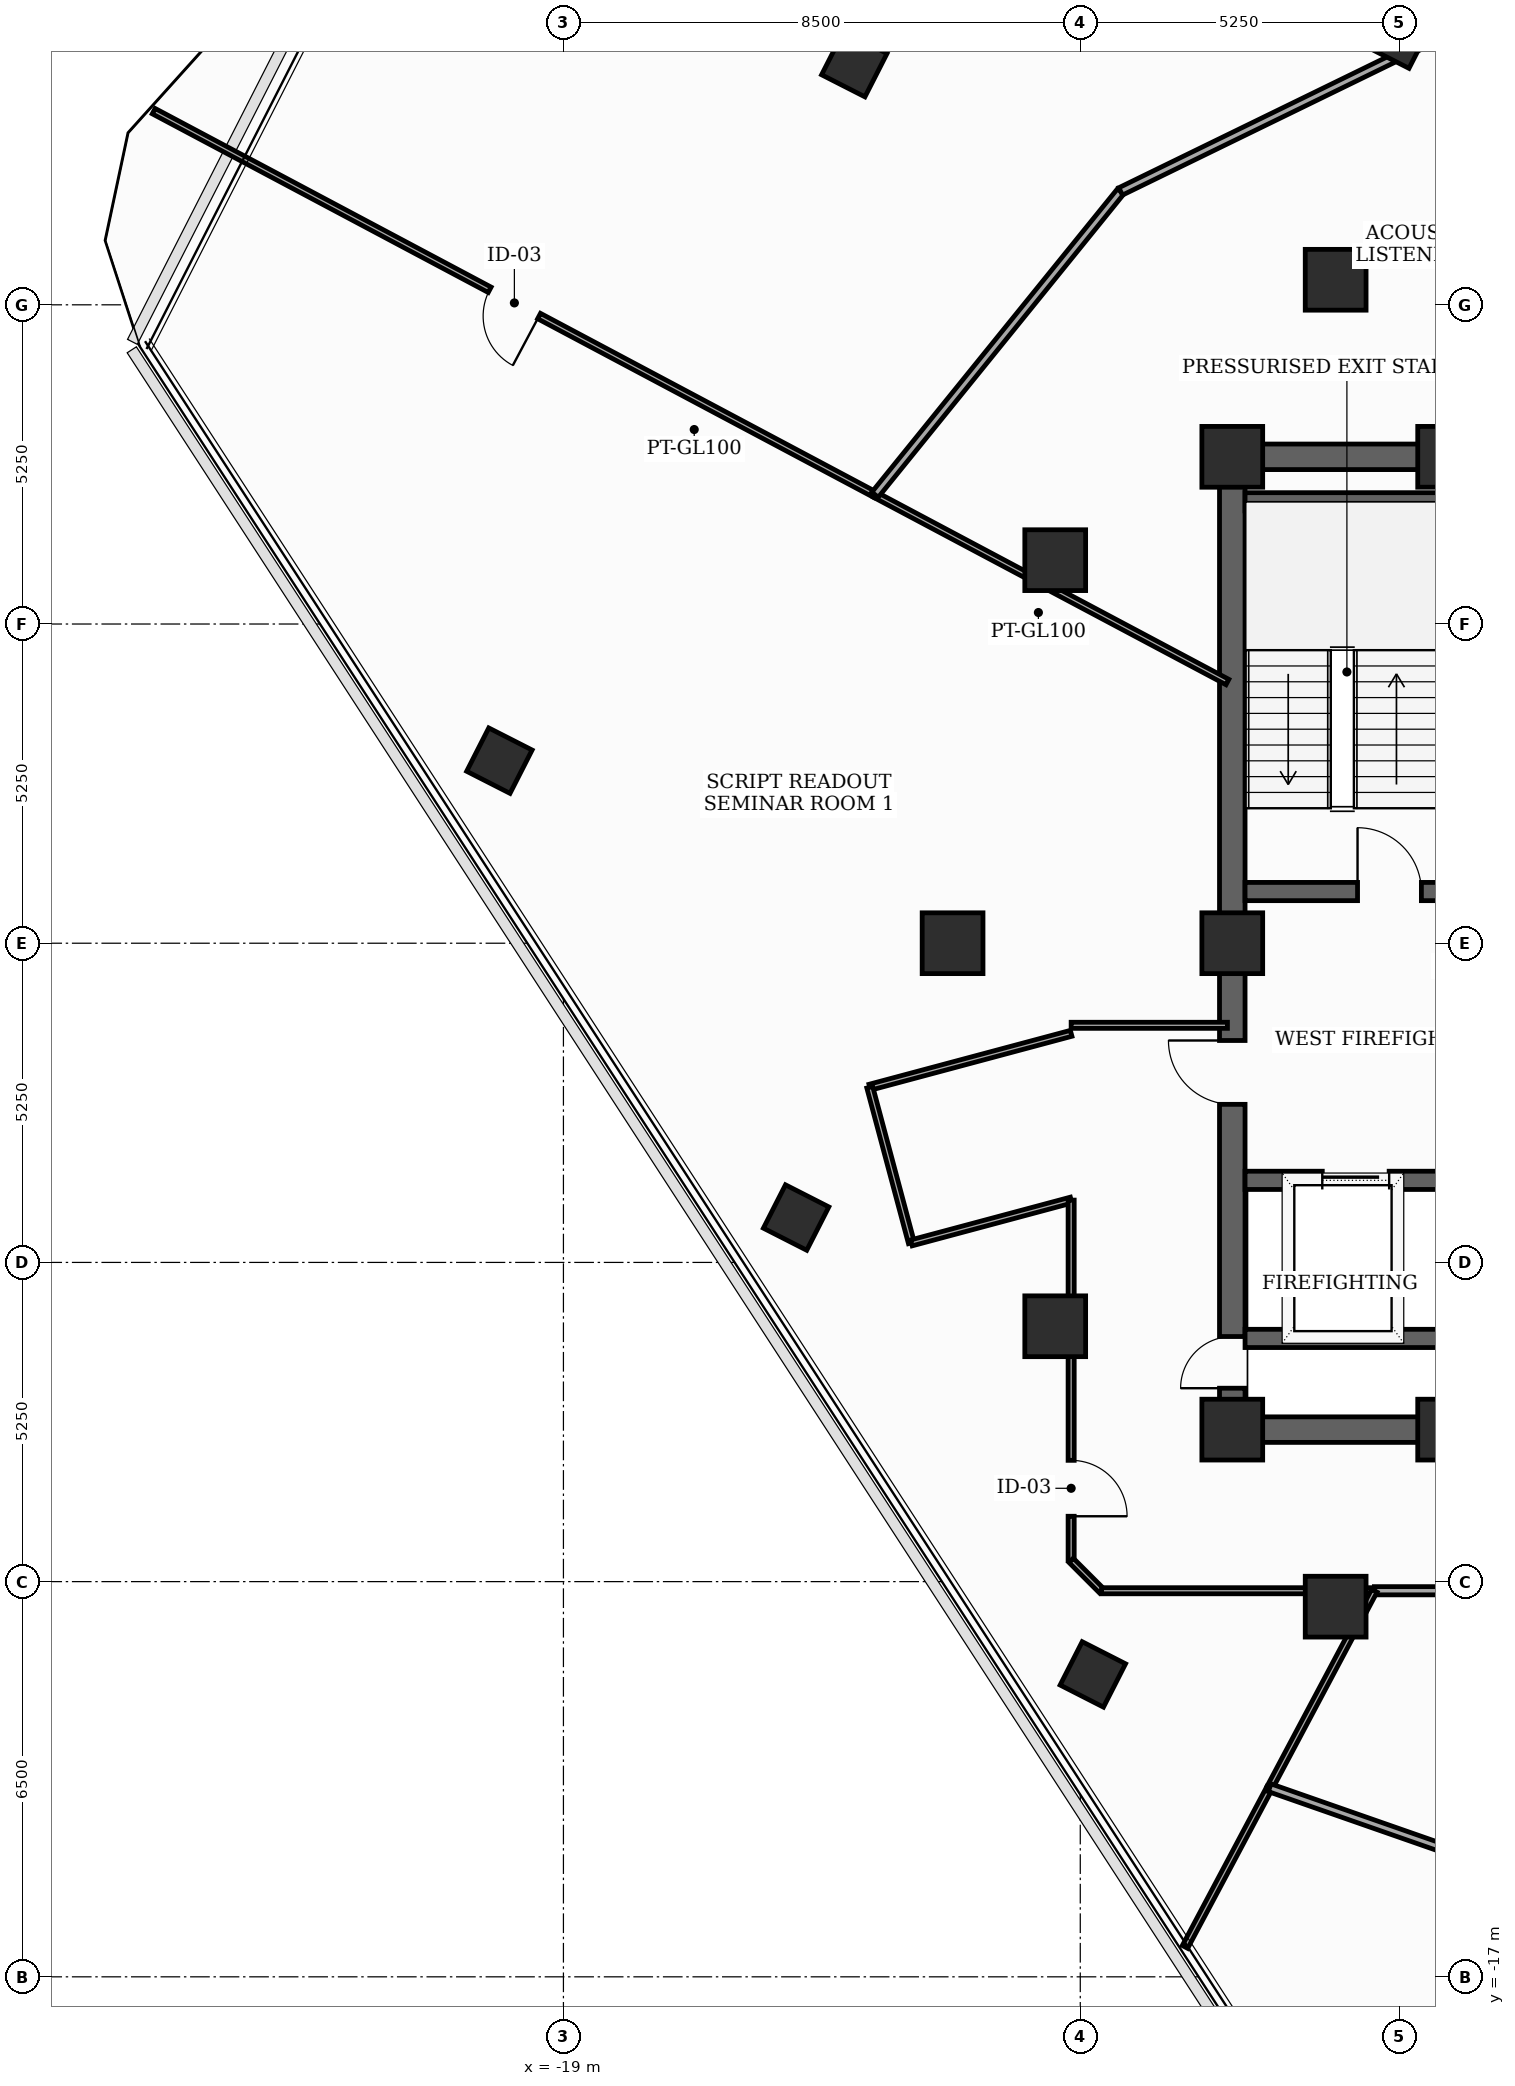
"""IFC4 building model, lengths in metres.
Left out: names, types, materials, properties, quantities, classifications, styles, units other than length and angle.
Written with IfcOpenShell. Run it as: python <this file> out.ifc"""

import sys

from ifc_helpers import new_model, si_unit, direction, frame, frame_2d, origin, origin_2d, place, context, subcontext, project, spatial, rectangle, extrude, element, fill, save


model = new_model("IFC4")
c1 = context("Model", 3, precision=1e-05, world=origin(), true_north=direction((0.0, 1.0)))
c2 = subcontext(c1, "Body", "Model", "MODEL_VIEW")
j1 = project(units=[si_unit("LENGTHUNIT", "METRE"), si_unit("PLANEANGLEUNIT", "RADIAN")], contexts=[c1])
p1 = place(None, origin())
s1 = spatial("IfcSite", under=j1, at=p1, CompositionType="ELEMENT")
p2 = place(p1, origin())
s2 = spatial("IfcBuilding", under=s1, at=p2, CompositionType="ELEMENT")
p3 = place(p2, frame((0.0, 0.0, 274.4)))
s3 = spatial("IfcBuildingStorey", under=s2, at=p3, CompositionType="ELEMENT", Elevation=274.4)
for number, where, z_axis, x_axis in (
    (1, (-8.0, -8.0, 0.0), (0.0, 0.0, 1.0), (1.0, 0.0, 0.0)),
    (2, (-4.45, -8.0, 0.0), (0.0, 0.0, 1.0), (1.0, 0.0, 0.0)),
    (3, (-4.45, 8.0, 0.0), (0.0, 0.0, 1.0), (1.0, 0.0, 0.0)),
    (4, (-8.0, 8.0, 0.0), (0.0, 0.0, 1.0), (1.0, 0.0, 0.0)),
    (5, (-8.0, 0.0, 0.0), (0.0, 0.0, 1.0), (1.0, 0.0, 0.0)),
    (6, (-6.3, 10.912, 0.0), (0.0, 0.0, 1.0), (1.0, 0.0, 0.0)),
    (7, (-10.912, 6.3, 0.0), (0.0, 0.0, 1.0), (1.0, 0.0, 0.0)),
    (8, (-12.6, 0.0, 0.0), (0.0, 0.0, 1.0), (1.0, 0.0, 0.0)),
    (9, (-10.912, -6.3, 0.0), (0.0, 0.0, 1.0), (1.0, 0.0, 0.0)),
    (10, (-6.3, -10.912, 0.0), (0.0, 0.0, 1.0), (1.0, 0.0, 0.0)),
):
    element("IfcColumn", number, at=place(p3, frame(where, z_axis=z_axis, x_axis=x_axis)), inside=s3, PredefinedType="COLUMN", context=c2, shape_type="SweptSolid", body=[
        extrude(rectangle(XDim=1.0, YDim=1.0, at=origin_2d()), origin(), (0.0, 0.0, 1.0), 3.7),
    ])
for number, where, z_axis, x_axis in (
    (11, (-5.269, 14.927, 0.0), (0.0, 0.0, 1.0), (0.454, 0.891, 0.0)),
    (12, (-14.216, 14.458, 0.0), (0.0, 0.0, 1.0), (0.454, 0.891, 0.0)),
    (13, (-20.053, 3.003, 0.0), (0.0, 0.0, 1.0), (0.454, 0.891, 0.0)),
    (14, (-15.173, -4.512, 0.0), (0.0, 0.0, 1.0), (0.454, 0.891, 0.0)),
    (15, (-10.293, -12.026, 0.0), (0.0, 0.0, 1.0), (0.454, 0.891, 0.0)),
):
    element("IfcColumn", number, at=place(p3, frame(where, z_axis=z_axis, x_axis=x_axis)), inside=s3, PredefinedType="COLUMN", context=c2, shape_type="SweptSolid", body=[
        extrude(rectangle(XDim=0.8, YDim=0.8, at=origin_2d()), origin(), (0.0, 0.0, 1.0), 3.7),
    ])
p4 = place(p3, frame((-8.0, -8.0, 0.0), z_axis=(0.0, 0.0, 1.0), x_axis=(0.0, 1.0, 0.0)))
e16 = element("IfcWall", 16, at=p4, inside=s3, PredefinedType="SHEAR", context=c2, shape_type="SweptSolid", body=[
    extrude(rectangle(XDim=16.0, YDim=0.42, at=frame_2d((8.0, 0.0))), origin(), (0.0, 0.0, 1.0), 3.46),
])
p5 = place(p4, frame((0.681, 0.0, 0.0)))
e17 = element("IfcOpeningElement", 17, at=p5, cuts=e16, PredefinedType="OPENING", context=c2, shape_type="SweptSolid", body=[
    extrude(rectangle(XDim=0.85, YDim=2.02, at=frame_2d((0.425, 1.01))), frame((0.0, 0.22, 0.0), z_axis=(0.0, -1.0, 0.0), x_axis=(1.0, 0.0, 0.0)), (0.0, 0.0, 1.0), 0.44),
])
p6 = place(p4, frame((5.35, 0.0, 0.0)))
e18 = element("IfcOpeningElement", 18, at=p6, cuts=e16, PredefinedType="OPENING", context=c2, shape_type="SweptSolid", body=[
    extrude(rectangle(XDim=1.05, YDim=2.15, at=frame_2d((0.525, 1.075))), frame((0.0, 0.22, 0.0), z_axis=(0.0, -1.0, 0.0), x_axis=(1.0, 0.0, 0.0)), (0.0, 0.0, 1.0), 0.44),
])
p7 = place(p3, frame((-8.0, -8.0, 0.0), z_axis=(0.0, 0.0, 1.0), x_axis=(1.0, 0.0, 0.0)))
e19 = element("IfcWall", 19, at=p7, inside=s3, PredefinedType="SHEAR", context=c2, shape_type="SweptSolid", body=[
    extrude(rectangle(XDim=16.0, YDim=0.42, at=frame_2d((8.0, 0.0))), origin(), (0.0, 0.0, 1.0), 3.46),
])
p8 = place(p7, frame((4.35, 0.0, 0.0)))
e20 = element("IfcOpeningElement", 20, at=p8, cuts=e19, PredefinedType="OPENING", context=c2, shape_type="SweptSolid", body=[
    extrude(rectangle(XDim=0.85, YDim=2.02, at=frame_2d((0.425, 1.01))), frame((0.0, 0.22, 0.0), z_axis=(0.0, -1.0, 0.0), x_axis=(1.0, 0.0, 0.0)), (0.0, 0.0, 1.0), 0.44),
])
p9 = place(p7, frame((6.49, 0.0, 0.0)))
e21 = element("IfcOpeningElement", 21, at=p9, cuts=e19, PredefinedType="OPENING", context=c2, shape_type="SweptSolid", body=[
    extrude(rectangle(XDim=0.85, YDim=2.02, at=frame_2d((0.425, 1.01))), frame((0.0, 0.22, 0.0), z_axis=(0.0, -1.0, 0.0), x_axis=(1.0, 0.0, 0.0)), (0.0, 0.0, 1.0), 0.44),
])
p10 = place(p7, frame((8.69, 0.0, 0.0)))
e22 = element("IfcOpeningElement", 22, at=p10, cuts=e19, PredefinedType="OPENING", context=c2, shape_type="SweptSolid", body=[
    extrude(rectangle(XDim=0.85, YDim=2.02, at=frame_2d((0.425, 1.01))), frame((0.0, 0.22, 0.0), z_axis=(0.0, -1.0, 0.0), x_axis=(1.0, 0.0, 0.0)), (0.0, 0.0, 1.0), 0.44),
])
p11 = place(p7, frame((10.8, 0.0, 0.0)))
e23 = element("IfcOpeningElement", 23, at=p11, cuts=e19, PredefinedType="OPENING", context=c2, shape_type="SweptSolid", body=[
    extrude(rectangle(XDim=0.85, YDim=2.02, at=frame_2d((0.425, 1.01))), frame((0.0, 0.22, 0.0), z_axis=(0.0, -1.0, 0.0), x_axis=(1.0, 0.0, 0.0)), (0.0, 0.0, 1.0), 0.44),
])
p12 = place(p3, frame((-8.0, 8.0, 0.0), z_axis=(0.0, 0.0, 1.0), x_axis=(1.0, 0.0, 0.0)))
e24 = element("IfcWall", 24, at=p12, inside=s3, PredefinedType="SHEAR", context=c2, shape_type="SweptSolid", body=[
    extrude(rectangle(XDim=16.0, YDim=0.42, at=frame_2d((8.0, 0.0))), origin(), (0.0, 0.0, 1.0), 3.46),
])
p13 = place(p12, frame((7.1, 0.0, 0.0)))
e25 = element("IfcOpeningElement", 25, at=p13, cuts=e24, PredefinedType="OPENING", context=c2, shape_type="SweptSolid", body=[
    extrude(rectangle(XDim=1.8, YDim=2.15, at=frame_2d((0.9, 1.075))), frame((0.0, 0.22, 0.0), z_axis=(0.0, -1.0, 0.0), x_axis=(1.0, 0.0, 0.0)), (0.0, 0.0, 1.0), 0.44),
])
p14 = place(p3, frame((-7.79, 0.85, 0.0), z_axis=(0.0, 0.0, 1.0), x_axis=(1.0, 0.0, 0.0)))
e26 = element("IfcWall", 26, at=p14, inside=s3, PredefinedType="SHEAR", context=c2, shape_type="SweptSolid", body=[
    extrude(rectangle(XDim=3.34, YDim=0.3, at=frame_2d((1.67, 0.0))), origin(), (0.0, 0.0, 1.0), 3.46),
])
p15 = place(p14, frame((1.85, 0.0, 0.0)))
e27 = element("IfcOpeningElement", 27, at=p15, cuts=e26, PredefinedType="OPENING", context=c2, shape_type="SweptSolid", body=[
    extrude(rectangle(XDim=1.05, YDim=2.15, at=frame_2d((0.525, 1.075))), frame((0.0, 0.16, 0.0), z_axis=(0.0, -1.0, 0.0), x_axis=(1.0, 0.0, 0.0)), (0.0, 0.0, 1.0), 0.32),
])
p16 = place(p3, frame((-7.79, 7.26, 0.0), z_axis=(0.0, 0.0, 1.0), x_axis=(1.0, 0.0, 0.0)))
e28 = element("IfcWall", 28, at=p16, inside=s3, PredefinedType="SHEAR", context=c2, shape_type="SweptSolid", body=[
    extrude(rectangle(XDim=3.34, YDim=0.3, at=frame_2d((1.67, 0.0))), origin(), (0.0, 0.0, 1.0), 3.46),
])
p17 = place(p3, frame((-7.79, -3.9, 0.0), z_axis=(0.0, 0.0, 1.0), x_axis=(1.0, 0.0, 0.0)))
e29 = element("IfcWall", 29, at=p17, inside=s3, PredefinedType="SHEAR", context=c2, shape_type="SweptSolid", body=[
    extrude(rectangle(XDim=3.34, YDim=0.3, at=frame_2d((1.67, 0.0))), origin(), (0.0, 0.0, 1.0), 3.46),
])
p18 = place(p17, frame((1.27, 0.0, 0.0)))
e30 = element("IfcOpeningElement", 30, at=p18, cuts=e29, PredefinedType="OPENING", context=c2, shape_type="SweptSolid", body=[
    extrude(rectangle(XDim=1.1, YDim=2.1, at=frame_2d((0.55, 1.05))), frame((0.0, 0.16, 0.0), z_axis=(0.0, -1.0, 0.0), x_axis=(1.0, 0.0, 0.0)), (0.0, 0.0, 1.0), 0.32),
])
p19 = place(p3, frame((-7.79, -6.5, 0.0), z_axis=(0.0, 0.0, 1.0), x_axis=(1.0, 0.0, 0.0)))
e31 = element("IfcWall", 31, at=p19, inside=s3, PredefinedType="SHEAR", context=c2, shape_type="SweptSolid", body=[
    extrude(rectangle(XDim=3.34, YDim=0.3, at=frame_2d((1.67, 0.0))), origin(), (0.0, 0.0, 1.0), 3.46),
])
p20 = place(p3, frame((-8.08, -1.35, 0.0), z_axis=(0.0, 0.0, 1.0), x_axis=(-1.0, 0.0, 0.0)))
e32 = element("IfcWall", 32, at=p20, inside=s3, PredefinedType="MOVABLE", context=c2, shape_type="SweptSolid", body=[
    extrude(rectangle(XDim=2.57, YDim=0.1, at=frame_2d((1.285, 0.0))), origin(), (0.0, 0.0, 1.0), 2.845),
])
p21 = place(p3, frame((-10.65, -1.482, 0.0), z_axis=(0.0, 0.0, 1.0), x_axis=(-0.965961397105, -0.2586862565, 0.0)))
e33 = element("IfcWall", 33, at=p21, inside=s3, PredefinedType="MOVABLE", context=c2, shape_type="SweptSolid", body=[
    extrude(rectangle(XDim=3.429, YDim=0.1, at=frame_2d((1.714, 0.0))), origin(), (0.0, 0.0, 1.0), 2.845),
])
p22 = place(p3, frame((-13.962, -2.369, 0.0), z_axis=(0.0, 0.0, 1.0), x_axis=(0.258413725385, -0.966034340245, 0.0)))
e34 = element("IfcWall", 34, at=p22, inside=s3, PredefinedType="MOVABLE", context=c2, shape_type="SweptSolid", body=[
    extrude(rectangle(XDim=2.65, YDim=0.1, at=frame_2d((1.325, 0.0))), origin(), (0.0, 0.0, 1.0), 2.045),
])
p23 = place(p3, frame((-13.277, -4.929, 0.0), z_axis=(0.0, 0.0, 1.0), x_axis=(0.965934830229, 0.258785439601, 0.0)))
e35 = element("IfcWall", 35, at=p23, inside=s3, PredefinedType="MOVABLE", context=c2, shape_type="SweptSolid", body=[
    extrude(rectangle(XDim=2.72, YDim=0.1, at=frame_2d((1.36, 0.0))), origin(), (0.0, 0.0, 1.0), 2.045),
])
p24 = place(p3, frame((-10.65, -4.225, 0.0), z_axis=(0.0, 0.0, 1.0), x_axis=(0.0, -1.0, 0.0)))
e36 = element("IfcWall", 36, at=p24, inside=s3, PredefinedType="MOVABLE", context=c2, shape_type="SweptSolid", body=[
    extrude(rectangle(XDim=5.925, YDim=0.1, at=frame_2d((2.962, 0.0))), origin(), (0.0, 0.0, 1.0), 2.045),
])
p25 = place(p24, frame((4.28, 0.0, 0.0)))
e37 = element("IfcOpeningElement", 37, at=p25, cuts=e36, PredefinedType="OPENING", context=c2, shape_type="SweptSolid", body=[
    extrude(rectangle(XDim=0.92, YDim=2.0, at=frame_2d((0.46, 1.0))), frame((0.0, 0.06, 0.0), z_axis=(0.0, -1.0, 0.0), x_axis=(1.0, 0.0, 0.0)), (0.0, 0.0, 1.0), 0.12),
])
p26 = place(p3, frame((-10.65, -10.15, 0.0), z_axis=(0.0, 0.0, 1.0), x_axis=(0.707106781187, -0.707106781187, 0.0)))
e38 = element("IfcWall", 38, at=p26, inside=s3, PredefinedType="MOVABLE", context=c2, shape_type="SweptSolid", body=[
    extrude(rectangle(XDim=0.707, YDim=0.1, at=frame_2d((0.354, 0.0))), origin(), (0.0, 0.0, 1.0), 3.46),
])
p27 = place(p3, frame((-10.15, -10.65, 0.0), z_axis=(0.0, 0.0, 1.0), x_axis=(1.0, 0.0, 0.0)))
e39 = element("IfcWall", 39, at=p27, inside=s3, PredefinedType="MOVABLE", context=c2, shape_type="SweptSolid", body=[
    extrude(rectangle(XDim=4.487, YDim=0.1, at=frame_2d((2.243, 0.0))), origin(), (0.0, 0.0, 1.0), 2.045),
])
p28 = place(p3, frame((-5.663, -10.65, 0.0), z_axis=(0.0, 0.0, 1.0), x_axis=(1.0, 0.0, 0.0)))
e40 = element("IfcWall", 40, at=p28, inside=s3, PredefinedType="PARTITIONING", context=c2, shape_type="SweptSolid", body=[
    extrude(rectangle(XDim=7.541, YDim=0.135, at=frame_2d((3.771, 0.0))), origin(), (0.0, 0.0, 1.0), 2.845),
])
p29 = place(p28, frame((3.295, 0.0, 0.0)))
e41 = element("IfcOpeningElement", 41, at=p29, cuts=e40, PredefinedType="OPENING", context=c2, shape_type="SweptSolid", body=[
    extrude(rectangle(XDim=0.95, YDim=2.1, at=frame_2d((0.475, 1.05))), frame((0.0, 0.077, 0.0), z_axis=(0.0, -1.0, 0.0), x_axis=(1.0, 0.0, 0.0)), (0.0, 0.0, 1.0), 0.155),
])
p30 = place(p3, frame((-7.385, -13.89, 0.0), z_axis=(0.0, 0.0, 1.0), x_axis=(0.469299548001, 0.883039033252, 0.0)))
e42 = element("IfcWall", 42, at=p30, inside=s3, PredefinedType="MOVABLE", context=c2, shape_type="SweptSolid", body=[
    extrude(rectangle(XDim=3.669, YDim=0.1, at=frame_2d((1.834, 0.0))), origin(), (0.0, 0.0, 1.0), 2.045),
])
p31 = place(p3, frame((-8.778, -16.509, 0.0), z_axis=(0.0, 0.0, 1.0), x_axis=(0.469528331535, 0.882917406039, 0.0)))
e43 = element("IfcWall", 43, at=p31, inside=s3, PredefinedType="MOVABLE", context=c2, shape_type="SweptSolid", body=[
    extrude(rectangle(XDim=2.966, YDim=0.1, at=frame_2d((1.483, 0.0))), origin(), (0.0, 0.0, 1.0), 2.045),
])
p32 = place(p3, frame((-13.875, 7.377, 0.0), z_axis=(0.0, 0.0, 1.0), x_axis=(-0.882931208137, 0.469502376668, 0.0)))
e44 = element("IfcWall", 44, at=p32, inside=s3, PredefinedType="MOVABLE", context=c2, shape_type="SweptSolid", body=[
    extrude(rectangle(XDim=13.436, YDim=0.1, at=frame_2d((6.718, 0.0))), origin(), (0.0, 0.0, 1.0), 2.045),
])
p33 = place(p32, frame((6.258, 0.0, 0.0)))
e45 = element("IfcOpeningElement", 45, at=p33, cuts=e44, PredefinedType="OPENING", context=c2, shape_type="SweptSolid", body=[
    extrude(rectangle(XDim=0.92, YDim=2.0, at=frame_2d((0.46, 1.0))), frame((0.0, 0.06, 0.0), z_axis=(0.0, -1.0, 0.0), x_axis=(1.0, 0.0, 0.0)), (0.0, 0.0, 1.0), 0.12),
])
p34 = place(p3, frame((-8.08, 4.296, 0.0), z_axis=(0.0, 0.0, 1.0), x_axis=(-0.882957693651, 0.469452565465, 0.0)))
e46 = element("IfcWall", 46, at=p34, inside=s3, PredefinedType="MOVABLE", context=c2, shape_type="SweptSolid", body=[
    extrude(rectangle(XDim=6.563, YDim=0.1, at=frame_2d((3.281, 0.0))), origin(), (0.0, 0.0, 1.0), 2.845),
])
p35 = place(p3, frame((-7.385, -13.89, 0.0), z_axis=(0.0, 0.0, 1.0), x_axis=(0.944127206291, -0.329581277291, 0.0)))
e47 = element("IfcWall", 47, at=p35, inside=s3, PredefinedType="PARTITIONING", context=c2, shape_type="SweptSolid", body=[
    extrude(rectangle(XDim=5.204, YDim=0.135, at=frame_2d((2.602, 0.0))), origin(), (0.0, 0.0, 1.0), 2.045),
])
p36 = place(p3, frame((-13.875, 7.377, 0.0), z_axis=(0.0, 0.0, 1.0), x_axis=(0.629304365076, 0.777158938761, 0.0)))
e48 = element("IfcWall", 48, at=p36, inside=s3, PredefinedType="PARTITIONING", context=c2, shape_type="SweptSolid", body=[
    extrude(rectangle(XDim=6.418, YDim=0.135, at=frame_2d((3.209, 0.0))), origin(), (0.0, 0.0, 1.0), 2.045),
])
p37 = place(p3, frame((-9.836, 12.365, 0.0), z_axis=(0.0, 0.0, 1.0), x_axis=(0.898823324655, 0.438311112174, 0.0)))
e49 = element("IfcWall", 49, at=p37, inside=s3, PredefinedType="PARTITIONING", context=c2, shape_type="SweptSolid", body=[
    extrude(rectangle(XDim=6.84, YDim=0.135, at=frame_2d((3.42, 0.0))), origin(), (0.0, 0.0, 1.0), 2.045),
])
p38 = place(p5, origin())
e50 = element("IfcDoor", 50, at=p38, inside=s3, OperationType="SINGLE_SWING_LEFT", PredefinedType="TRAPDOOR", context=c2, shape_type="SweptSolid", body=[
    extrude(rectangle(XDim=0.85, YDim=2.02, at=frame_2d((0.425, 1.01))), frame((0.0, 0.025, 0.0), z_axis=(0.0, -1.0, 0.0), x_axis=(1.0, 0.0, 0.0)), (0.0, 0.0, 1.0), 0.05),
])
fill(e17, e50)
p39 = place(p6, origin())
e51 = element("IfcDoor", 51, at=p39, inside=s3, OperationType="SINGLE_SWING_RIGHT", PredefinedType="DOOR", context=c2, shape_type="SweptSolid", body=[
    extrude(rectangle(XDim=1.05, YDim=2.15, at=frame_2d((0.525, 1.075))), frame((0.0, 0.025, 0.0), z_axis=(0.0, -1.0, 0.0), x_axis=(1.0, 0.0, 0.0)), (0.0, 0.0, 1.0), 0.05),
])
fill(e18, e51)
p40 = place(p15, origin())
e52 = element("IfcDoor", 52, at=p40, inside=s3, OperationType="SINGLE_SWING_LEFT", PredefinedType="DOOR", context=c2, shape_type="SweptSolid", body=[
    extrude(rectangle(XDim=1.05, YDim=2.15, at=frame_2d((0.525, 1.075))), frame((0.0, 0.025, 0.0), z_axis=(0.0, -1.0, 0.0), x_axis=(1.0, 0.0, 0.0)), (0.0, 0.0, 1.0), 0.05),
])
fill(e27, e52)
p41 = place(p18, origin())
e53 = element("IfcDoor", 53, at=p41, inside=s3, OperationType="SLIDING_TO_LEFT", PredefinedType="DOOR", context=c2, shape_type="SweptSolid", body=[
    extrude(rectangle(XDim=1.1, YDim=2.1, at=frame_2d((0.55, 1.05))), frame((0.0, 0.025, 0.0), z_axis=(0.0, -1.0, 0.0), x_axis=(1.0, 0.0, 0.0)), (0.0, 0.0, 1.0), 0.05),
])
fill(e30, e53)
p42 = place(p25, origin())
e54 = element("IfcDoor", 54, at=p42, inside=s3, OperationType="SINGLE_SWING_RIGHT", PredefinedType="DOOR", context=c2, shape_type="SweptSolid", body=[
    extrude(rectangle(XDim=0.92, YDim=2.0, at=frame_2d((0.46, 1.0))), frame((0.0, 0.025, 0.0), z_axis=(0.0, -1.0, 0.0), x_axis=(1.0, 0.0, 0.0)), (0.0, 0.0, 1.0), 0.05),
])
fill(e37, e54)
p43 = place(p33, origin())
e55 = element("IfcDoor", 55, at=p43, inside=s3, OperationType="SINGLE_SWING_LEFT", PredefinedType="DOOR", context=c2, shape_type="SweptSolid", body=[
    extrude(rectangle(XDim=0.92, YDim=2.0, at=frame_2d((0.46, 1.0))), frame((0.0, 0.025, 0.0), z_axis=(0.0, -1.0, 0.0), x_axis=(1.0, 0.0, 0.0)), (0.0, 0.0, 1.0), 0.05),
])
fill(e45, e55)
save(model, sys.argv[1])
